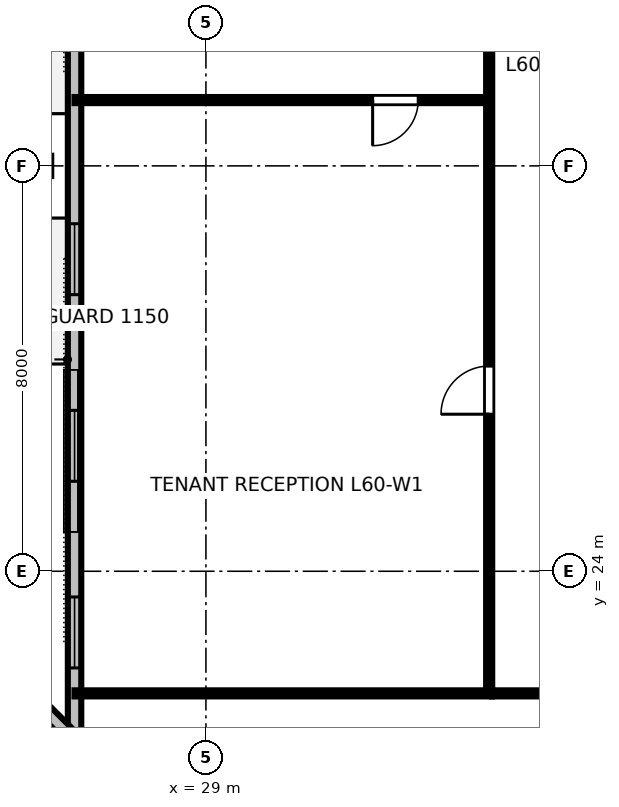
"""IFC4 building model, lengths in metres.
Left out: names, types, materials, properties, quantities, classifications, styles, units other than length and angle.
Written with IfcOpenShell. Run it as: python <this file> out.ifc"""

import sys

from ifc_helpers import new_model, si_unit, direction, frame, frame_2d, origin, origin_2d, place, context, subcontext, project, spatial, rectangle, hollow_rectangle, i_section, extrude, element, fill, save


model = new_model("IFC4")
c1 = context("Model", 3, precision=1e-05, world=origin(), true_north=direction((0.0, 1.0)))
c2 = subcontext(c1, "Body", "Model", "MODEL_VIEW")
j1 = project(units=[si_unit("LENGTHUNIT", "METRE"), si_unit("PLANEANGLEUNIT", "RADIAN")], contexts=[c1])
p1 = place(None, origin())
s1 = spatial("IfcSite", under=j1, at=p1, CompositionType="ELEMENT")
p2 = place(p1, origin())
s2 = spatial("IfcBuilding", under=s1, at=p2, CompositionType="ELEMENT")
p3 = place(p2, frame((0.0, 0.0, 227.4)))
s3 = spatial("IfcBuildingStorey", under=s2, at=p3, CompositionType="ELEMENT", Elevation=227.4)
p4 = place(p3, frame((25.747, 32.0, 0.0), z_axis=(0.178954370443, 0.0, 0.98385737447), x_axis=(-0.98385737447, 0.0, 0.178954370443)))
e1 = element("IfcColumn", 1, at=p4, inside=s3, PredefinedType="COLUMN", context=c2, shape_type="SweptSolid", body=[
    extrude(i_section(OverallWidth=0.401, OverallDepth=0.399, WebThickness=0.025, FlangeThickness=0.04, FilletRadius=0.025, at=origin_2d()), origin(), (0.0, 0.0, 1.0), 3.428),
])
p5 = place(p3, frame((25.653, 20.446, 0.0), z_axis=(0.177516374376, 0.155854312843, 0.971698188738), x_axis=(-0.730201092603, -0.64109572948, 0.236225803001)))
e2 = element("IfcColumn", 2, at=p5, inside=s3, PredefinedType="COLUMN", context=c2, shape_type="SweptSolid", body=[
    extrude(hollow_rectangle(XDim=0.58, YDim=0.7, WallThickness=0.032, at=origin_2d()), origin(), (0.0, 0.0, 1.0), 3.471),
])
p6 = place(p3, frame((26.407, 44.149, 0.0), z_axis=(0.0, 0.0, 1.0), x_axis=(0.0, -1.0, 0.0)))
e3 = element("IfcWall", 3, at=p6, inside=s3, PredefinedType="STANDARD", context=c2, shape_type="SweptSolid", body=[
    extrude(rectangle(XDim=24.298, YDim=0.265, at=frame_2d((12.149, 0.0))), origin(), (0.0, 0.0, 1.0), 2.832),
])
p7 = place(p6, frame((8.469, 0.0, 0.0)))
e4 = element("IfcOpeningElement", 4, at=p7, cuts=e3, PredefinedType="OPENING", context=c2, shape_type="SweptSolid", body=[
    extrude(rectangle(XDim=1.4, YDim=2.15, at=frame_2d((0.7, 1.075))), frame((0.0, 0.142, 0.0), z_axis=(0.0, -1.0, 0.0), x_axis=(1.0, 0.0, 0.0)), (0.0, 0.0, 1.0), 0.285),
])
p8 = place(p6, frame((2.241, 0.0, 0.85)))
e5 = element("IfcOpeningElement", 5, at=p8, cuts=e3, PredefinedType="OPENING", context=c2, shape_type="SweptSolid", body=[
    extrude(rectangle(XDim=1.4, YDim=1.2, at=frame_2d((0.7, 0.6))), frame((0.0, 0.142, 0.0), z_axis=(0.0, -1.0, 0.0), x_axis=(1.0, 0.0, 0.0)), (0.0, 0.0, 1.0), 0.285),
])
p9 = place(p6, frame((5.925, 0.0, 0.85)))
e6 = element("IfcOpeningElement", 6, at=p9, cuts=e3, PredefinedType="OPENING", context=c2, shape_type="SweptSolid", body=[
    extrude(rectangle(XDim=1.4, YDim=1.2, at=frame_2d((0.7, 0.6))), frame((0.0, 0.142, 0.0), z_axis=(0.0, -1.0, 0.0), x_axis=(1.0, 0.0, 0.0)), (0.0, 0.0, 1.0), 0.285),
])
p10 = place(p6, frame((13.291, 0.0, 0.85)))
e7 = element("IfcOpeningElement", 7, at=p10, cuts=e3, PredefinedType="OPENING", context=c2, shape_type="SweptSolid", body=[
    extrude(rectangle(XDim=1.4, YDim=1.2, at=frame_2d((0.7, 0.6))), frame((0.0, 0.142, 0.0), z_axis=(0.0, -1.0, 0.0), x_axis=(1.0, 0.0, 0.0)), (0.0, 0.0, 1.0), 0.285),
])
p11 = place(p6, frame((16.974, 0.0, 0.85)))
e8 = element("IfcOpeningElement", 8, at=p11, cuts=e3, PredefinedType="OPENING", context=c2, shape_type="SweptSolid", body=[
    extrude(rectangle(XDim=1.4, YDim=1.2, at=frame_2d((0.7, 0.6))), frame((0.0, 0.142, 0.0), z_axis=(0.0, -1.0, 0.0), x_axis=(1.0, 0.0, 0.0)), (0.0, 0.0, 1.0), 0.285),
])
p12 = place(p6, frame((20.657, 0.0, 0.85)))
e9 = element("IfcOpeningElement", 9, at=p12, cuts=e3, PredefinedType="OPENING", context=c2, shape_type="SweptSolid", body=[
    extrude(rectangle(XDim=1.4, YDim=1.2, at=frame_2d((0.7, 0.6))), frame((0.0, 0.142, 0.0), z_axis=(0.0, -1.0, 0.0), x_axis=(1.0, 0.0, 0.0)), (0.0, 0.0, 1.0), 0.285),
])
p13 = place(p3, frame((25.833, 21.236, 0.0), z_axis=(0.0, 0.0, 1.0), x_axis=(0.707106781187, -0.707106781187, 0.0)))
e10 = element("IfcWall", 10, at=p13, inside=s3, PredefinedType="STANDARD", context=c2, shape_type="SweptSolid", body=[
    extrude(rectangle(XDim=10.405, YDim=0.265, at=frame_2d((5.203, 0.0))), origin(), (0.0, 0.0, 1.0), 2.832),
])
p14 = place(p3, frame((34.65, 21.59, 0.0), z_axis=(0.0, 0.0, 1.0), x_axis=(1.0, 0.0, 0.0)))
e11 = element("IfcWall", 11, at=p14, inside=s3, PredefinedType="PARTITIONING", context=c2, shape_type="SweptSolid", body=[
    extrude(rectangle(XDim=10.33, YDim=0.12, at=frame_2d((5.165, 0.0))), origin(), (0.0, 0.0, 1.0), 2.655),
])
p15 = place(p14, frame((2.762, 0.0, 0.0)))
e12 = element("IfcOpeningElement", 12, at=p15, cuts=e11, PredefinedType="OPENING", context=c2, shape_type="SweptSolid", body=[
    extrude(rectangle(XDim=0.95, YDim=2.15, at=frame_2d((0.475, 1.075))), frame((0.0, 0.07, 0.0), z_axis=(0.0, -1.0, 0.0), x_axis=(1.0, 0.0, 0.0)), (0.0, 0.0, 1.0), 0.14),
])
p16 = place(p14, frame((7.857, 0.0, 0.0)))
e13 = element("IfcOpeningElement", 13, at=p16, cuts=e11, PredefinedType="OPENING", context=c2, shape_type="SweptSolid", body=[
    extrude(rectangle(XDim=0.95, YDim=2.15, at=frame_2d((0.475, 1.075))), frame((0.0, 0.07, 0.0), z_axis=(0.0, -1.0, 0.0), x_axis=(1.0, 0.0, 0.0)), (0.0, 0.0, 1.0), 0.14),
])
p17 = place(p3, frame((34.59, 33.299, 0.0), z_axis=(0.0, 0.0, 1.0), x_axis=(-1.0, 0.0, 0.0)))
e14 = element("IfcWall", 14, at=p17, inside=s3, PredefinedType="PARTITIONING", context=c2, shape_type="SweptSolid", body=[
    extrude(rectangle(XDim=8.183, YDim=0.12, at=frame_2d((4.091, 0.0))), origin(), (0.0, 0.0, 1.0), 2.655),
])
p18 = place(p17, frame((1.4, 0.0, 0.0)))
e15 = element("IfcOpeningElement", 15, at=p18, cuts=e14, PredefinedType="OPENING", context=c2, shape_type="SweptSolid", body=[
    extrude(rectangle(XDim=0.9, YDim=2.15, at=frame_2d((0.45, 1.075))), frame((0.0, 0.07, 0.0), z_axis=(0.0, -1.0, 0.0), x_axis=(1.0, 0.0, 0.0)), (0.0, 0.0, 1.0), 0.14),
])
p19 = place(p3, frame((34.59, 21.65, 0.0), z_axis=(0.0, 0.0, 1.0), x_axis=(0.0, 1.0, 0.0)))
e16 = element("IfcWall", 16, at=p19, inside=s3, PredefinedType="PARTITIONING", context=c2, shape_type="SweptSolid", body=[
    extrude(rectangle(XDim=20.7, YDim=0.12, at=frame_2d((10.35, 0.0))), origin(), (0.0, 0.0, 1.0), 2.655),
])
p20 = place(p19, frame((5.449, 0.0, 0.0)))
e17 = element("IfcOpeningElement", 17, at=p20, cuts=e16, PredefinedType="OPENING", context=c2, shape_type="SweptSolid", body=[
    extrude(rectangle(XDim=0.95, YDim=2.15, at=frame_2d((0.475, 1.075))), frame((0.0, 0.07, 0.0), z_axis=(0.0, -1.0, 0.0), x_axis=(1.0, 0.0, 0.0)), (0.0, 0.0, 1.0), 0.14),
])
p21 = place(p19, frame((15.599, 0.0, 0.0)))
e18 = element("IfcOpeningElement", 18, at=p21, cuts=e16, PredefinedType="OPENING", context=c2, shape_type="SweptSolid", body=[
    extrude(rectangle(XDim=0.95, YDim=2.15, at=frame_2d((0.475, 1.075))), frame((0.0, 0.07, 0.0), z_axis=(0.0, -1.0, 0.0), x_axis=(1.0, 0.0, 0.0)), (0.0, 0.0, 1.0), 0.14),
])
p22 = place(p3, frame((34.65, 21.59, 0.0), z_axis=(0.0, 0.0, 1.0), x_axis=(-1.0, 0.0, 0.0)))
e19 = element("IfcWall", 19, at=p22, inside=s3, PredefinedType="PARTITIONING", context=c2, shape_type="SweptSolid", body=[
    extrude(rectangle(XDim=8.243, YDim=0.12, at=frame_2d((4.121, 0.0))), origin(), (0.0, 0.0, 1.0), 2.655),
])
p23 = place(p10, origin())
e20 = element("IfcWindow", 20, at=p23, inside=s3, PartitioningType="SINGLE_PANEL", PredefinedType="WINDOW", context=c2, shape_type="SweptSolid", body=[
    extrude(rectangle(XDim=1.4, YDim=1.2, at=frame_2d((0.7, 0.6))), frame((0.0, 0.03, 0.0), z_axis=(0.0, -1.0, 0.0), x_axis=(1.0, 0.0, 0.0)), (0.0, 0.0, 1.0), 0.06),
])
fill(e7, e20)
p24 = place(p11, origin())
e21 = element("IfcWindow", 21, at=p24, inside=s3, PartitioningType="SINGLE_PANEL", PredefinedType="WINDOW", context=c2, shape_type="SweptSolid", body=[
    extrude(rectangle(XDim=1.4, YDim=1.2, at=frame_2d((0.7, 0.6))), frame((0.0, 0.03, 0.0), z_axis=(0.0, -1.0, 0.0), x_axis=(1.0, 0.0, 0.0)), (0.0, 0.0, 1.0), 0.06),
])
fill(e8, e21)
p25 = place(p12, origin())
e22 = element("IfcWindow", 22, at=p25, inside=s3, PartitioningType="SINGLE_PANEL", PredefinedType="WINDOW", context=c2, shape_type="SweptSolid", body=[
    extrude(rectangle(XDim=1.4, YDim=1.2, at=frame_2d((0.7, 0.6))), frame((0.0, 0.03, 0.0), z_axis=(0.0, -1.0, 0.0), x_axis=(1.0, 0.0, 0.0)), (0.0, 0.0, 1.0), 0.06),
])
fill(e9, e22)
p26 = place(p18, origin())
e23 = element("IfcDoor", 23, at=p26, inside=s3, OperationType="SINGLE_SWING_RIGHT", PredefinedType="DOOR", context=c2, shape_type="SweptSolid", body=[
    extrude(rectangle(XDim=0.9, YDim=2.15, at=frame_2d((0.45, 1.075))), frame((0.0, 0.025, 0.0), z_axis=(0.0, -1.0, 0.0), x_axis=(1.0, 0.0, 0.0)), (0.0, 0.0, 1.0), 0.05),
])
fill(e15, e23)
p27 = place(p20, origin())
e24 = element("IfcDoor", 24, at=p27, inside=s3, OperationType="SINGLE_SWING_LEFT", PredefinedType="DOOR", context=c2, shape_type="SweptSolid", body=[
    extrude(rectangle(XDim=0.95, YDim=2.15, at=frame_2d((0.475, 1.075))), frame((0.0, 0.025, 0.0), z_axis=(0.0, -1.0, 0.0), x_axis=(1.0, 0.0, 0.0)), (0.0, 0.0, 1.0), 0.05),
])
fill(e17, e24)
save(model, sys.argv[1])
